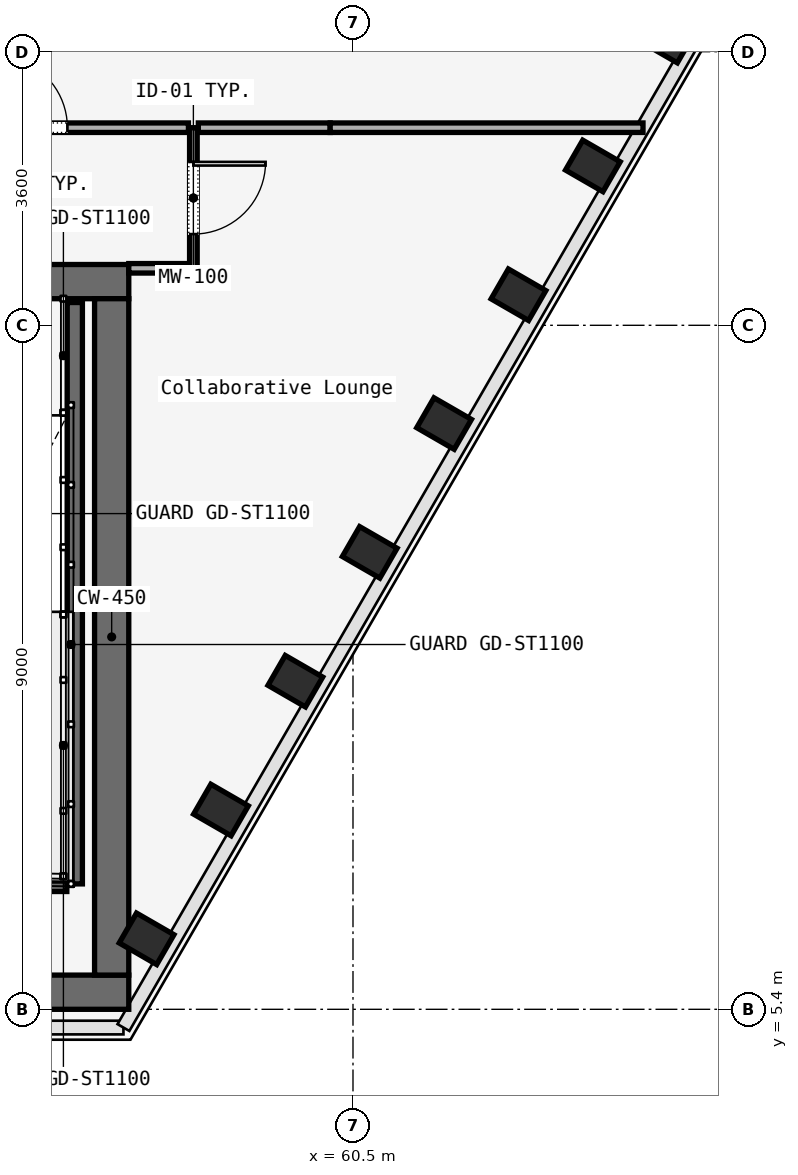
"""IFC4 building model, lengths in metres.
Left out: names, types, materials, properties, quantities, classifications, styles, units other than length and angle.
Written with IfcOpenShell. Run it as: python <this file> out.ifc"""

import sys

from ifc_helpers import new_model, si_unit, direction, frame, frame_2d, origin, origin_2d, place, context, subcontext, project, spatial, rectangle, i_section, extrude, element, fill, save


model = new_model("IFC4")
c1 = context("Model", 3, precision=1e-05, world=origin(), true_north=direction((0.0, 1.0)))
c2 = subcontext(c1, "Body", "Model", "MODEL_VIEW")
j1 = project(units=[si_unit("LENGTHUNIT", "METRE"), si_unit("PLANEANGLEUNIT", "RADIAN")], contexts=[c1])
p1 = place(None, origin())
s1 = spatial("IfcSite", under=j1, at=p1, CompositionType="ELEMENT")
p2 = place(p1, origin())
s2 = spatial("IfcBuilding", under=s1, at=p2, CompositionType="ELEMENT")
p3 = place(p2, frame((0.0, 0.0, 51.2)))
s3 = spatial("IfcBuildingStorey", under=s2, at=p3, CompositionType="ELEMENT", Elevation=51.2)
p4 = place(p3, frame((26.45, 14.975, 0.0), z_axis=(0.0, 0.0, 1.0), x_axis=(1.0, 0.0, 0.0)))
e1 = element("IfcWall", 1, at=p4, inside=s3, PredefinedType="SOLIDWALL", context=c2, shape_type="SweptSolid", body=[
    extrude(rectangle(XDim=31.1, YDim=0.45, at=frame_2d((15.55, 0.0))), origin(), (0.0, 0.0, 1.0), 3.58),
])
p5 = place(p4, frame((1.65, 0.0, 0.0)))
e2 = element("IfcOpeningElement", 2, at=p5, cuts=e1, PredefinedType="OPENING", context=c2, shape_type="SweptSolid", body=[
    extrude(rectangle(XDim=1.1, YDim=2.2, at=frame_2d((0.55, 1.1))), frame((0.0, 0.225, 0.0), z_axis=(0.0, -1.0, 0.0), x_axis=(1.0, 0.0, 0.0)), (0.0, 0.0, 1.0), 0.45),
])
p6 = place(p4, frame((13.65, 0.0, 0.0)))
e3 = element("IfcOpeningElement", 3, at=p6, cuts=e1, PredefinedType="OPENING", context=c2, shape_type="SweptSolid", body=[
    extrude(rectangle(XDim=1.1, YDim=2.2, at=frame_2d((0.55, 1.1))), frame((0.0, 0.225, 0.0), z_axis=(0.0, -1.0, 0.0), x_axis=(1.0, 0.0, 0.0)), (0.0, 0.0, 1.0), 0.45),
])
p7 = place(p4, frame((25.55, 0.0, 0.0)))
e4 = element("IfcOpeningElement", 4, at=p7, cuts=e1, PredefinedType="OPENING", context=c2, shape_type="SweptSolid", body=[
    extrude(rectangle(XDim=1.1, YDim=2.2, at=frame_2d((0.55, 1.1))), frame((0.0, 0.225, 0.0), z_axis=(0.0, -1.0, 0.0), x_axis=(1.0, 0.0, 0.0)), (0.0, 0.0, 1.0), 0.45),
])
p8 = place(p4, frame((10.7, 0.0, 0.0)))
e5 = element("IfcOpeningElement", 5, at=p8, cuts=e1, PredefinedType="OPENING", context=c2, shape_type="SweptSolid", body=[
    extrude(rectangle(XDim=1.4, YDim=2.2, at=frame_2d((0.7, 1.1))), frame((0.0, 0.225, 0.0), z_axis=(0.0, -1.0, 0.0), x_axis=(1.0, 0.0, 0.0)), (0.0, 0.0, 1.0), 0.45),
])
p9 = place(p4, frame((19.35, 0.0, 0.0)))
e6 = element("IfcOpeningElement", 6, at=p9, cuts=e1, PredefinedType="OPENING", context=c2, shape_type="SweptSolid", body=[
    extrude(rectangle(XDim=1.1, YDim=2.2, at=frame_2d((0.55, 1.1))), frame((0.0, 0.225, 0.0), z_axis=(0.0, -1.0, 0.0), x_axis=(1.0, 0.0, 0.0)), (0.0, 0.0, 1.0), 0.45),
])
p10 = place(p4, frame((21.4, 0.0, 0.0)))
e7 = element("IfcOpeningElement", 7, at=p10, cuts=e1, PredefinedType="OPENING", context=c2, shape_type="SweptSolid", body=[
    extrude(rectangle(XDim=0.9, YDim=2.1, at=frame_2d((0.45, 1.05))), frame((0.0, 0.225, 0.0), z_axis=(0.0, -1.0, 0.0), x_axis=(1.0, 0.0, 0.0)), (0.0, 0.0, 1.0), 0.45),
])
p11 = place(p4, frame((23.35, 0.0, 0.0)))
e8 = element("IfcOpeningElement", 8, at=p11, cuts=e1, PredefinedType="OPENING", context=c2, shape_type="SweptSolid", body=[
    extrude(rectangle(XDim=1.3, YDim=2.3, at=frame_2d((0.65, 1.15))), frame((0.0, 0.225, 0.0), z_axis=(0.0, -1.0, 0.0), x_axis=(1.0, 0.0, 0.0)), (0.0, 0.0, 1.0), 0.45),
])
p12 = place(p3, frame((26.45, 5.625, 0.0), z_axis=(0.0, 0.0, 1.0), x_axis=(1.0, 0.0, 0.0)))
e9 = element("IfcWall", 9, at=p12, inside=s3, PredefinedType="SOLIDWALL", context=c2, shape_type="SweptSolid", body=[
    extrude(rectangle(XDim=31.1, YDim=0.45, at=frame_2d((15.55, 0.0))), origin(), (0.0, 0.0, 1.0), 3.58),
])
p13 = place(p3, frame((57.325, 5.85, 0.0), z_axis=(0.0, 0.0, 1.0), x_axis=(0.0, 1.0, 0.0)))
e10 = element("IfcWall", 10, at=p13, inside=s3, PredefinedType="SOLIDWALL", context=c2, shape_type="SweptSolid", body=[
    extrude(rectangle(XDim=8.9, YDim=0.45, at=frame_2d((4.45, 0.0))), origin(), (0.0, 0.0, 1.0), 3.58),
])
for number, where, z_axis, x_axis in (
    (11, (57.784, 6.327, 0.0), (0.0, 0.0, 1.0), (0.5, 0.866, 0.0)),
    (12, (58.763, 8.022, 0.0), (0.0, 0.0, 1.0), (0.5, 0.866, 0.0)),
    (13, (59.742, 9.717, 0.0), (0.0, 0.0, 1.0), (0.5, 0.866, 0.0)),
    (14, (60.72, 11.412, 0.0), (0.0, 0.0, 1.0), (0.5, 0.866, 0.0)),
    (15, (61.699, 13.107, 0.0), (0.0, 0.0, 1.0), (0.5, 0.866, 0.0)),
    (16, (62.677, 14.802, 0.0), (0.0, 0.0, 1.0), (0.5, 0.866, 0.0)),
    (17, (63.656, 16.497, 0.0), (0.0, 0.0, 1.0), (0.5, 0.866, 0.0)),
    (18, (64.635, 18.192, 0.0), (0.0, 0.0, 1.0), (0.5, 0.866, 0.0)),
):
    element("IfcColumn", number, at=place(p3, frame(where, z_axis=z_axis, x_axis=x_axis)), inside=s3, PredefinedType="COLUMN", context=c2, shape_type="SweptSolid", body=[
        extrude(i_section(OverallWidth=0.454, OverallDepth=0.569, WebThickness=0.078, FlangeThickness=0.08, FilletRadius=0.015, at=origin_2d()), origin(), (0.0, 0.0, 1.0), 3.58),
    ])
p14 = place(p3, frame((56.84, 14.7, 0.0), z_axis=(0.0, 0.0, 1.0), x_axis=(0.0, -1.0, 0.0)))
e19 = element("IfcWall", 19, at=p14, inside=s3, PredefinedType="SOLIDWALL", context=c2, shape_type="SweptSolid", body=[
    extrude(rectangle(XDim=7.65, YDim=0.2, at=frame_2d((3.825, 0.0))), origin(), (0.0, 0.0, 1.0), 3.8),
])
p15 = place(p3, frame((53.62, 7.05, 0.0), z_axis=(0.0, 0.0, 1.0), x_axis=(1.0, 0.0, 0.0)))
e20 = element("IfcWall", 20, at=p15, inside=s3, PredefinedType="SOLIDWALL", context=c2, shape_type="SweptSolid", body=[
    extrude(rectangle(XDim=3.115, YDim=0.2, at=frame_2d((1.558, 0.0))), origin(), (0.0, 0.0, 1.0), 3.8),
])
p16 = place(p3, frame((58.4, 17.0, 0.0), z_axis=(0.0, 0.0, 1.0), x_axis=(0.0, -1.0, 0.0)))
e21 = element("IfcWall", 21, at=p16, inside=s3, PredefinedType="MOVABLE", context=c2, shape_type="SweptSolid", body=[
    extrude(rectangle(XDim=1.85, YDim=0.1, at=frame_2d((0.925, 0.0))), origin(), (0.0, 0.0, 1.0), 2.933),
])
p17 = place(p16, frame((0.45, 0.0, 0.0)))
e22 = element("IfcOpeningElement", 22, at=p17, cuts=e21, PredefinedType="OPENING", context=c2, shape_type="SweptSolid", body=[
    extrude(rectangle(XDim=0.95, YDim=2.2, at=frame_2d((0.475, 1.1))), frame((0.0, 0.05, 0.0), z_axis=(0.0, -1.0, 0.0), x_axis=(1.0, 0.0, 0.0)), (0.0, 0.0, 1.0), 0.1),
])
p18 = place(p3, frame((58.335, 15.15, 0.0), z_axis=(0.0, 0.0, 1.0), x_axis=(-1.0, 0.0, 0.0)))
e23 = element("IfcWall", 23, at=p18, inside=s3, PredefinedType="PARTITIONING", context=c2, shape_type="SweptSolid", body=[
    extrude(rectangle(XDim=0.785, YDim=0.125, at=frame_2d((0.393, 0.0))), origin(), (0.0, 0.0, 1.0), 2.933),
])
p19 = place(p3, frame((54.2, 17.0, 0.0), z_axis=(0.0, 0.0, 1.0), x_axis=(1.0, 0.0, 0.0)))
e24 = element("IfcWall", 24, at=p19, inside=s3, PredefinedType="PARTITIONING", context=c2, shape_type="SweptSolid", body=[
    extrude(rectangle(XDim=4.135, YDim=0.125, at=frame_2d((2.067, 0.0))), origin(), (0.0, 0.0, 1.0), 2.933),
])
p20 = place(p19, frame((1.593, 0.0, 0.0)))
e25 = element("IfcOpeningElement", 25, at=p20, cuts=e24, PredefinedType="OPENING", context=c2, shape_type="SweptSolid", body=[
    extrude(rectangle(XDim=0.95, YDim=2.2, at=frame_2d((0.475, 1.1))), frame((0.0, 0.062, 0.0), z_axis=(0.0, -1.0, 0.0), x_axis=(1.0, 0.0, 0.0)), (0.0, 0.0, 1.0), 0.125),
])
p21 = place(p3, frame((58.465, 17.0, 0.0), z_axis=(0.0, 0.0, 1.0), x_axis=(1.0, 0.0, 0.0)))
e26 = element("IfcWall", 26, at=p21, inside=s3, PredefinedType="PARTITIONING", context=c2, shape_type="SweptSolid", body=[
    extrude(rectangle(XDim=1.735, YDim=0.125, at=frame_2d((0.867, 0.0))), origin(), (0.0, 0.0, 1.0), 2.933),
])
p22 = place(p3, frame((60.2, 17.0, 0.0), z_axis=(0.0, 0.0, 1.0), x_axis=(1.0, 0.0, 0.0)))
e27 = element("IfcWall", 27, at=p22, inside=s3, PredefinedType="PARTITIONING", context=c2, shape_type="SweptSolid", body=[
    extrude(rectangle(XDim=4.116, YDim=0.125, at=frame_2d((2.058, 0.0))), origin(), (0.0, 0.0, 1.0), 2.933),
])
p23 = place(p17, origin())
e28 = element("IfcDoor", 28, at=p23, inside=s3, OperationType="SINGLE_SWING_RIGHT", PredefinedType="DOOR", context=c2, shape_type="SweptSolid", body=[
    extrude(rectangle(XDim=0.95, YDim=2.2, at=frame_2d((0.475, 1.1))), frame((0.0, 0.025, 0.0), z_axis=(0.0, -1.0, 0.0), x_axis=(1.0, 0.0, 0.0)), (0.0, 0.0, 1.0), 0.05),
])
fill(e22, e28)
p24 = place(p20, origin())
e29 = element("IfcDoor", 29, at=p24, inside=s3, OperationType="SINGLE_SWING_LEFT", PredefinedType="DOOR", context=c2, shape_type="SweptSolid", body=[
    extrude(rectangle(XDim=0.95, YDim=2.2, at=frame_2d((0.475, 1.1))), frame((0.0, 0.025, 0.0), z_axis=(0.0, -1.0, 0.0), x_axis=(1.0, 0.0, 0.0)), (0.0, 0.0, 1.0), 0.05),
])
fill(e25, e29)
save(model, sys.argv[1])
